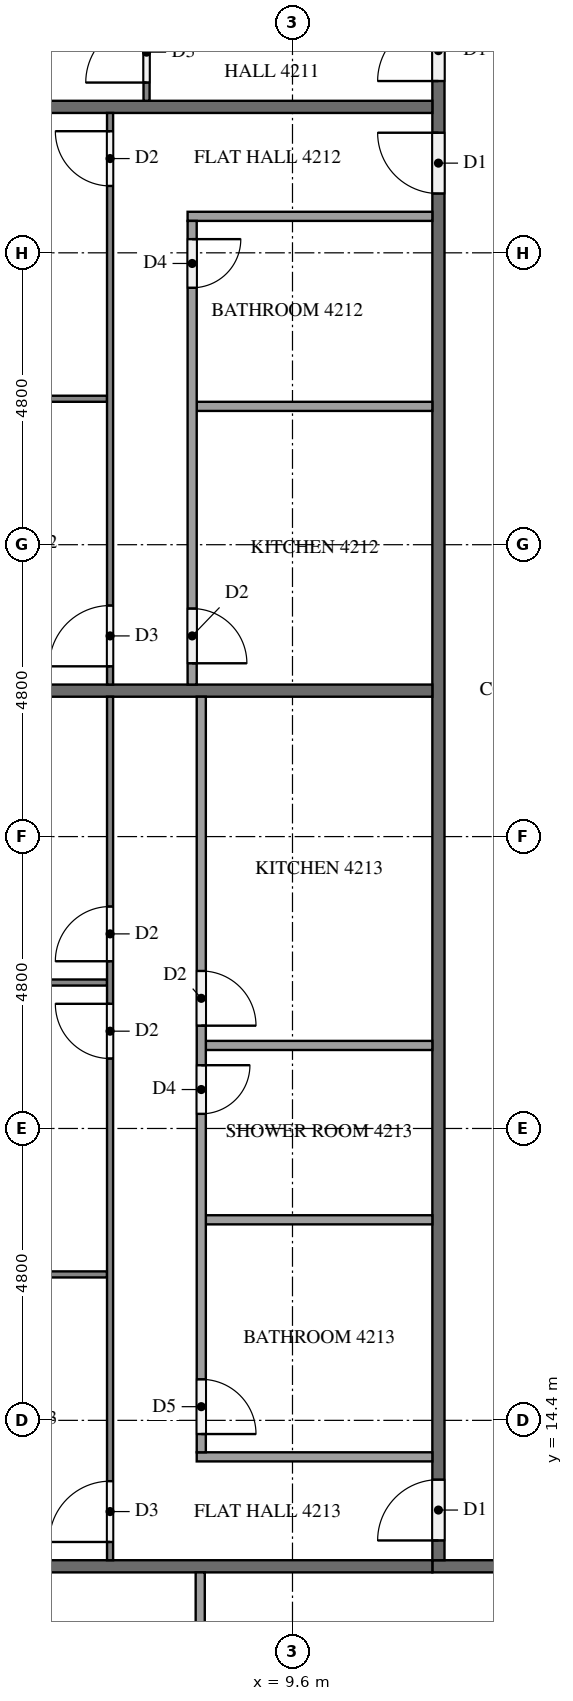
"""IFC4 building model, lengths in metres.
Left out: names, types, materials, properties, quantities, classifications, styles, units other than length and angle.
Written with IfcOpenShell. Run it as: python <this file> out.ifc"""

import sys

from ifc_helpers import new_model, si_unit, direction, frame, frame_2d, origin, place, context, subcontext, project, spatial, rectangle, extrude, element, fill, save


model = new_model("IFC4")
c1 = context("Model", 3, precision=1e-05, world=origin(), true_north=direction((0.0, 1.0)))
c2 = subcontext(c1, "Body", "Model", "MODEL_VIEW")
j1 = project(units=[si_unit("LENGTHUNIT", "METRE"), si_unit("PLANEANGLEUNIT", "RADIAN")], contexts=[c1])
p1 = place(None, origin())
s1 = spatial("IfcSite", under=j1, at=p1, CompositionType="ELEMENT")
p2 = place(p1, origin())
s2 = spatial("IfcBuilding", under=s1, at=p2, CompositionType="ELEMENT")
p3 = place(p2, frame((0.0, 0.0, 163.0)))
s3 = spatial("IfcBuildingStorey", under=s2, at=p3, CompositionType="ELEMENT", Elevation=163.0)
p4 = place(p3, frame((50.5, 12.0, 0.0), z_axis=(0.0, 0.0, 1.0), x_axis=(-1.0, 0.0, 0.0)))
e1 = element("IfcWall", 1, at=p4, inside=s3, PredefinedType="PARTITIONING", context=c2, shape_type="SweptSolid", body=[
    extrude(rectangle(XDim=38.6, YDim=0.2, at=frame_2d((19.3, 0.0))), origin(), (0.0, 0.0, 1.0), 3.2),
])
p5 = place(p4, frame((34.125, 0.0, 0.0)))
e2 = element("IfcOpeningElement", 2, at=p5, cuts=e1, PredefinedType="OPENING", context=c2, shape_type="SweptSolid", body=[
    extrude(rectangle(XDim=1.0, YDim=2.1, at=frame_2d((0.5, 1.05))), frame((0.0, 0.11, 0.0), z_axis=(0.0, -1.0, 0.0), x_axis=(1.0, 0.0, 0.0)), (0.0, 0.0, 1.0), 0.22),
])
p6 = place(p4, frame((32.275, 0.0, 0.0)))
e3 = element("IfcOpeningElement", 3, at=p6, cuts=e1, PredefinedType="OPENING", context=c2, shape_type="SweptSolid", body=[
    extrude(rectangle(XDim=1.0, YDim=2.1, at=frame_2d((0.5, 1.05))), frame((0.0, 0.11, 0.0), z_axis=(0.0, -1.0, 0.0), x_axis=(1.0, 0.0, 0.0)), (0.0, 0.0, 1.0), 0.22),
])
p7 = place(p4, frame((12.525, 0.0, 0.0)))
e4 = element("IfcOpeningElement", 4, at=p7, cuts=e1, PredefinedType="OPENING", context=c2, shape_type="SweptSolid", body=[
    extrude(rectangle(XDim=1.0, YDim=2.1, at=frame_2d((0.5, 1.05))), frame((0.0, 0.11, 0.0), z_axis=(0.0, -1.0, 0.0), x_axis=(1.0, 0.0, 0.0)), (0.0, 0.0, 1.0), 0.22),
])
p8 = place(p4, frame((10.625, 0.0, 0.0)))
e5 = element("IfcOpeningElement", 5, at=p8, cuts=e1, PredefinedType="OPENING", context=c2, shape_type="SweptSolid", body=[
    extrude(rectangle(XDim=1.1, YDim=2.1, at=frame_2d((0.55, 1.05))), frame((0.0, 0.11, 0.0), z_axis=(0.0, -1.0, 0.0), x_axis=(1.0, 0.0, 0.0)), (0.0, 0.0, 1.0), 0.22),
])
p9 = place(p3, frame((12.0, 12.1, 0.0), z_axis=(0.0, 0.0, 1.0), x_axis=(0.0, 1.0, 0.0)))
e6 = element("IfcWall", 6, at=p9, inside=s3, PredefinedType="PARTITIONING", context=c2, shape_type="SweptSolid", body=[
    extrude(rectangle(XDim=28.6, YDim=0.2, at=frame_2d((14.3, 0.0))), origin(), (0.0, 0.0, 1.0), 3.2),
])
p10 = place(p9, frame((24.325, 0.0, 0.0)))
e7 = element("IfcOpeningElement", 7, at=p10, cuts=e6, PredefinedType="OPENING", context=c2, shape_type="SweptSolid", body=[
    extrude(rectangle(XDim=1.0, YDim=2.1, at=frame_2d((0.5, 1.05))), frame((0.0, 0.11, 0.0), z_axis=(0.0, -1.0, 0.0), x_axis=(1.0, 0.0, 0.0)), (0.0, 0.0, 1.0), 0.22),
])
p11 = place(p9, frame((22.475, 0.0, 0.0)))
e8 = element("IfcOpeningElement", 8, at=p11, cuts=e6, PredefinedType="OPENING", context=c2, shape_type="SweptSolid", body=[
    extrude(rectangle(XDim=1.0, YDim=2.1, at=frame_2d((0.5, 1.05))), frame((0.0, 0.11, 0.0), z_axis=(0.0, -1.0, 0.0), x_axis=(1.0, 0.0, 0.0)), (0.0, 0.0, 1.0), 0.22),
])
p12 = place(p9, frame((0.325, 0.0, 0.0)))
e9 = element("IfcOpeningElement", 9, at=p12, cuts=e6, PredefinedType="OPENING", context=c2, shape_type="SweptSolid", body=[
    extrude(rectangle(XDim=1.0, YDim=2.1, at=frame_2d((0.5, 1.05))), frame((0.0, 0.11, 0.0), z_axis=(0.0, -1.0, 0.0), x_axis=(1.0, 0.0, 0.0)), (0.0, 0.0, 1.0), 0.22),
])
for number, where, z_axis, x_axis in (
    (10, (0.1, 12.0, 0.0), (0.0, 0.0, 1.0), (1.0, 0.0, 0.0)),
    (11, (0.1, 36.0, 0.0), (0.0, 0.0, 1.0), (1.0, 0.0, 0.0)),
    (12, (0.1, 26.4, 0.0), (0.0, 0.0, 1.0), (1.0, 0.0, 0.0)),
):
    element("IfcWall", number, at=place(p3, frame(where, z_axis=z_axis, x_axis=x_axis)), inside=s3, PredefinedType="PARTITIONING", context=c2, shape_type="SweptSolid", body=[
        extrude(rectangle(XDim=11.8, YDim=0.2, at=frame_2d((5.9, 0.0))), origin(), (0.0, 0.0, 1.0), 3.2),
    ])
p13 = place(p3, frame((8.083, 11.9, 0.0), z_axis=(0.0, 0.0, 1.0), x_axis=(0.0, -1.0, 0.0)))
e13 = element("IfcWall", 13, at=p13, inside=s3, PredefinedType="PARTITIONING", context=c2, shape_type="SweptSolid", body=[
    extrude(rectangle(XDim=2.975, YDim=0.15, at=frame_2d((1.487, 0.0))), origin(), (0.0, 0.0, 1.0), 3.2),
])
p14 = place(p3, frame((7.2, 36.1, 0.0), z_axis=(0.0, 0.0, 1.0), x_axis=(0.0, 1.0, 0.0)))
e14 = element("IfcWall", 14, at=p14, inside=s3, PredefinedType="PARTITIONING", context=c2, shape_type="SweptSolid", body=[
    extrude(rectangle(XDim=11.8, YDim=0.1, at=frame_2d((5.9, 0.0))), origin(), (0.0, 0.0, 1.0), 3.2),
])
p15 = place(p14, frame((0.3, 0.0, 0.0)))
e15 = element("IfcOpeningElement", 15, at=p15, cuts=e14, PredefinedType="OPENING", context=c2, shape_type="SweptSolid", body=[
    extrude(rectangle(XDim=1.0, YDim=2.1, at=frame_2d((0.5, 1.05))), frame((0.0, 0.06, 0.0), z_axis=(0.0, -1.0, 0.0), x_axis=(1.0, 0.0, 0.0)), (0.0, 0.0, 1.0), 0.12),
])
p16 = place(p14, frame((10.6, 0.0, 0.0)))
e16 = element("IfcOpeningElement", 16, at=p16, cuts=e14, PredefinedType="OPENING", context=c2, shape_type="SweptSolid", body=[
    extrude(rectangle(XDim=0.9, YDim=2.1, at=frame_2d((0.45, 1.05))), frame((0.0, 0.06, 0.0), z_axis=(0.0, -1.0, 0.0), x_axis=(1.0, 0.0, 0.0)), (0.0, 0.0, 1.0), 0.12),
])
p17 = place(p3, frame((6.55, 31.2, 0.0), z_axis=(0.0, 0.0, 1.0), x_axis=(-1.0, 0.0, 0.0)))
e17 = element("IfcWall", 17, at=p17, inside=s3, PredefinedType="PARTITIONING", context=c2, shape_type="SweptSolid", body=[
    extrude(rectangle(XDim=6.45, YDim=0.1, at=frame_2d((3.225, 0.0))), origin(), (0.0, 0.0, 1.0), 3.2),
])
p18 = place(p3, frame((6.6, 26.5, 0.0), z_axis=(0.0, 0.0, 1.0), x_axis=(0.0, 1.0, 0.0)))
e18 = element("IfcWall", 18, at=p18, inside=s3, PredefinedType="PARTITIONING", context=c2, shape_type="SweptSolid", body=[
    extrude(rectangle(XDim=9.4, YDim=0.1, at=frame_2d((4.7, 0.0))), origin(), (0.0, 0.0, 1.0), 3.2),
])
p19 = place(p18, frame((8.2, 0.0, 0.0)))
e19 = element("IfcOpeningElement", 19, at=p19, cuts=e18, PredefinedType="OPENING", context=c2, shape_type="SweptSolid", body=[
    extrude(rectangle(XDim=0.9, YDim=2.1, at=frame_2d((0.45, 1.05))), frame((0.0, 0.06, 0.0), z_axis=(0.0, -1.0, 0.0), x_axis=(1.0, 0.0, 0.0)), (0.0, 0.0, 1.0), 0.12),
])
p20 = place(p18, frame((0.3, 0.0, 0.0)))
e20 = element("IfcOpeningElement", 20, at=p20, cuts=e18, PredefinedType="OPENING", context=c2, shape_type="SweptSolid", body=[
    extrude(rectangle(XDim=1.0, YDim=2.1, at=frame_2d((0.5, 1.05))), frame((0.0, 0.06, 0.0), z_axis=(0.0, -1.0, 0.0), x_axis=(1.0, 0.0, 0.0)), (0.0, 0.0, 1.0), 0.12),
])
p21 = place(p3, frame((11.9, 31.075, 0.0), z_axis=(0.0, 0.0, 1.0), x_axis=(-1.0, 0.0, 0.0)))
e21 = element("IfcWall", 21, at=p21, inside=s3, PredefinedType="PARTITIONING", context=c2, shape_type="SweptSolid", body=[
    extrude(rectangle(XDim=3.875, YDim=0.15, at=frame_2d((1.938, 0.0))), origin(), (0.0, 0.0, 1.0), 3.2),
])
p22 = place(p3, frame((11.9, 34.2, 0.0), z_axis=(0.0, 0.0, 1.0), x_axis=(-1.0, 0.0, 0.0)))
e22 = element("IfcWall", 22, at=p22, inside=s3, PredefinedType="PARTITIONING", context=c2, shape_type="SweptSolid", body=[
    extrude(rectangle(XDim=4.025, YDim=0.15, at=frame_2d((2.012, 0.0))), origin(), (0.0, 0.0, 1.0), 3.2),
])
p23 = place(p3, frame((7.95, 34.125, 0.0), z_axis=(0.0, 0.0, 1.0), x_axis=(0.0, -1.0, 0.0)))
e23 = element("IfcWall", 23, at=p23, inside=s3, PredefinedType="PARTITIONING", context=c2, shape_type="SweptSolid", body=[
    extrude(rectangle(XDim=7.625, YDim=0.15, at=frame_2d((3.812, 0.0))), origin(), (0.0, 0.0, 1.0), 3.2),
])
p24 = place(p23, frame((0.3, 0.0, 0.0)))
e24 = element("IfcOpeningElement", 24, at=p24, cuts=e23, PredefinedType="OPENING", context=c2, shape_type="SweptSolid", body=[
    extrude(rectangle(XDim=0.8, YDim=2.1, at=frame_2d((0.4, 1.05))), frame((0.0, 0.085, 0.0), z_axis=(0.0, -1.0, 0.0), x_axis=(1.0, 0.0, 0.0)), (0.0, 0.0, 1.0), 0.17),
])
p25 = place(p23, frame((6.375, 0.0, 0.0)))
e25 = element("IfcOpeningElement", 25, at=p25, cuts=e23, PredefinedType="OPENING", context=c2, shape_type="SweptSolid", body=[
    extrude(rectangle(XDim=0.9, YDim=2.1, at=frame_2d((0.45, 1.05))), frame((0.0, 0.085, 0.0), z_axis=(0.0, -1.0, 0.0), x_axis=(1.0, 0.0, 0.0)), (0.0, 0.0, 1.0), 0.17),
])
for number, where, z_axis, x_axis in (
    (26, (6.55, 16.8, 0.0), (0.0, 0.0, 1.0), (-1.0, 0.0, 0.0)),
    (27, (6.55, 21.6, 0.0), (0.0, 0.0, 1.0), (-1.0, 0.0, 0.0)),
):
    element("IfcWall", number, at=place(p3, frame(where, z_axis=z_axis, x_axis=x_axis)), inside=s3, PredefinedType="PARTITIONING", context=c2, shape_type="SweptSolid", body=[
        extrude(rectangle(XDim=6.45, YDim=0.1, at=frame_2d((3.225, 0.0))), origin(), (0.0, 0.0, 1.0), 3.2),
    ])
p26 = place(p3, frame((6.6, 12.1, 0.0), z_axis=(0.0, 0.0, 1.0), x_axis=(0.0, 1.0, 0.0)))
e28 = element("IfcWall", 28, at=p26, inside=s3, PredefinedType="PARTITIONING", context=c2, shape_type="SweptSolid", body=[
    extrude(rectangle(XDim=14.2, YDim=0.1, at=frame_2d((7.1, 0.0))), origin(), (0.0, 0.0, 1.0), 3.2),
])
p27 = place(p26, frame((0.3, 0.0, 0.0)))
e29 = element("IfcOpeningElement", 29, at=p27, cuts=e28, PredefinedType="OPENING", context=c2, shape_type="SweptSolid", body=[
    extrude(rectangle(XDim=1.0, YDim=2.1, at=frame_2d((0.5, 1.05))), frame((0.0, 0.06, 0.0), z_axis=(0.0, -1.0, 0.0), x_axis=(1.0, 0.0, 0.0)), (0.0, 0.0, 1.0), 0.12),
])
p28 = place(p26, frame((8.25, 0.0, 0.0)))
e30 = element("IfcOpeningElement", 30, at=p28, cuts=e28, PredefinedType="OPENING", context=c2, shape_type="SweptSolid", body=[
    extrude(rectangle(XDim=0.9, YDim=2.1, at=frame_2d((0.45, 1.05))), frame((0.0, 0.06, 0.0), z_axis=(0.0, -1.0, 0.0), x_axis=(1.0, 0.0, 0.0)), (0.0, 0.0, 1.0), 0.12),
])
p29 = place(p26, frame((9.85, 0.0, 0.0)))
e31 = element("IfcOpeningElement", 31, at=p29, cuts=e28, PredefinedType="OPENING", context=c2, shape_type="SweptSolid", body=[
    extrude(rectangle(XDim=0.9, YDim=2.1, at=frame_2d((0.45, 1.05))), frame((0.0, 0.06, 0.0), z_axis=(0.0, -1.0, 0.0), x_axis=(1.0, 0.0, 0.0)), (0.0, 0.0, 1.0), 0.12),
])
for number, where, z_axis, x_axis in (
    (32, (11.9, 17.698, 0.0), (0.0, 0.0, 1.0), (-1.0, 0.0, 0.0)),
    (33, (11.9, 20.565, 0.0), (0.0, 0.0, 1.0), (-1.0, 0.0, 0.0)),
):
    element("IfcWall", number, at=place(p3, frame(where, z_axis=z_axis, x_axis=x_axis)), inside=s3, PredefinedType="PARTITIONING", context=c2, shape_type="SweptSolid", body=[
        extrude(rectangle(XDim=3.725, YDim=0.15, at=frame_2d((1.862, 0.0))), origin(), (0.0, 0.0, 1.0), 3.2),
    ])
p30 = place(p3, frame((11.9, 13.8, 0.0), z_axis=(0.0, 0.0, 1.0), x_axis=(-1.0, 0.0, 0.0)))
e34 = element("IfcWall", 34, at=p30, inside=s3, PredefinedType="PARTITIONING", context=c2, shape_type="SweptSolid", body=[
    extrude(rectangle(XDim=3.875, YDim=0.15, at=frame_2d((1.938, 0.0))), origin(), (0.0, 0.0, 1.0), 3.2),
])
p31 = place(p3, frame((8.1, 26.3, 0.0), z_axis=(0.0, 0.0, 1.0), x_axis=(0.0, -1.0, 0.0)))
e35 = element("IfcWall", 35, at=p31, inside=s3, PredefinedType="PARTITIONING", context=c2, shape_type="SweptSolid", body=[
    extrude(rectangle(XDim=12.425, YDim=0.15, at=frame_2d((6.212, 0.0))), origin(), (0.0, 0.0, 1.0), 3.2),
])
p32 = place(p31, frame((11.225, 0.0, 0.0)))
e36 = element("IfcOpeningElement", 36, at=p32, cuts=e35, PredefinedType="OPENING", context=c2, shape_type="SweptSolid", body=[
    extrude(rectangle(XDim=0.9, YDim=2.1, at=frame_2d((0.45, 1.05))), frame((0.0, 0.085, 0.0), z_axis=(0.0, -1.0, 0.0), x_axis=(1.0, 0.0, 0.0)), (0.0, 0.0, 1.0), 0.17),
])
p33 = place(p31, frame((6.06, 0.0, 0.0)))
e37 = element("IfcOpeningElement", 37, at=p33, cuts=e35, PredefinedType="OPENING", context=c2, shape_type="SweptSolid", body=[
    extrude(rectangle(XDim=0.8, YDim=2.1, at=frame_2d((0.4, 1.05))), frame((0.0, 0.085, 0.0), z_axis=(0.0, -1.0, 0.0), x_axis=(1.0, 0.0, 0.0)), (0.0, 0.0, 1.0), 0.17),
])
p34 = place(p31, frame((4.51, 0.0, 0.0)))
e38 = element("IfcOpeningElement", 38, at=p34, cuts=e35, PredefinedType="OPENING", context=c2, shape_type="SweptSolid", body=[
    extrude(rectangle(XDim=0.9, YDim=2.1, at=frame_2d((0.45, 1.05))), frame((0.0, 0.085, 0.0), z_axis=(0.0, -1.0, 0.0), x_axis=(1.0, 0.0, 0.0)), (0.0, 0.0, 1.0), 0.17),
])
p35 = place(p10, origin())
e39 = element("IfcDoor", 39, at=p35, inside=s3, OperationType="SINGLE_SWING_LEFT", PredefinedType="DOOR", context=c2, shape_type="SweptSolid", body=[
    extrude(rectangle(XDim=1.0, YDim=2.1, at=frame_2d((0.5, 1.05))), frame((0.0, 0.025, 0.0), z_axis=(0.0, -1.0, 0.0), x_axis=(1.0, 0.0, 0.0)), (0.0, 0.0, 1.0), 0.05),
])
fill(e7, e39)
p36 = place(p11, origin())
e40 = element("IfcDoor", 40, at=p36, inside=s3, OperationType="SINGLE_SWING_RIGHT", PredefinedType="DOOR", context=c2, shape_type="SweptSolid", body=[
    extrude(rectangle(XDim=1.0, YDim=2.1, at=frame_2d((0.5, 1.05))), frame((0.0, 0.025, 0.0), z_axis=(0.0, -1.0, 0.0), x_axis=(1.0, 0.0, 0.0)), (0.0, 0.0, 1.0), 0.05),
])
fill(e8, e40)
p37 = place(p12, origin())
e41 = element("IfcDoor", 41, at=p37, inside=s3, OperationType="SINGLE_SWING_LEFT", PredefinedType="DOOR", context=c2, shape_type="SweptSolid", body=[
    extrude(rectangle(XDim=1.0, YDim=2.1, at=frame_2d((0.5, 1.05))), frame((0.0, 0.025, 0.0), z_axis=(0.0, -1.0, 0.0), x_axis=(1.0, 0.0, 0.0)), (0.0, 0.0, 1.0), 0.05),
])
fill(e9, e41)
p38 = place(p15, origin())
e42 = element("IfcDoor", 42, at=p38, inside=s3, OperationType="SINGLE_SWING_LEFT", PredefinedType="DOOR", context=c2, shape_type="SweptSolid", body=[
    extrude(rectangle(XDim=1.0, YDim=2.1, at=frame_2d((0.5, 1.05))), frame((0.0, 0.025, 0.0), z_axis=(0.0, -1.0, 0.0), x_axis=(1.0, 0.0, 0.0)), (0.0, 0.0, 1.0), 0.05),
])
fill(e15, e42)
p39 = place(p19, origin())
e43 = element("IfcDoor", 43, at=p39, inside=s3, OperationType="SINGLE_SWING_RIGHT", PredefinedType="DOOR", context=c2, shape_type="SweptSolid", body=[
    extrude(rectangle(XDim=0.9, YDim=2.1, at=frame_2d((0.45, 1.05))), frame((0.0, 0.025, 0.0), z_axis=(0.0, -1.0, 0.0), x_axis=(1.0, 0.0, 0.0)), (0.0, 0.0, 1.0), 0.05),
])
fill(e19, e43)
p40 = place(p20, origin())
e44 = element("IfcDoor", 44, at=p40, inside=s3, OperationType="SINGLE_SWING_LEFT", PredefinedType="DOOR", context=c2, shape_type="SweptSolid", body=[
    extrude(rectangle(XDim=1.0, YDim=2.1, at=frame_2d((0.5, 1.05))), frame((0.0, 0.025, 0.0), z_axis=(0.0, -1.0, 0.0), x_axis=(1.0, 0.0, 0.0)), (0.0, 0.0, 1.0), 0.05),
])
fill(e20, e44)
p41 = place(p24, origin())
e45 = element("IfcDoor", 45, at=p41, inside=s3, OperationType="SINGLE_SWING_LEFT", PredefinedType="DOOR", context=c2, shape_type="SweptSolid", body=[
    extrude(rectangle(XDim=0.8, YDim=2.1, at=frame_2d((0.4, 1.05))), frame((0.0, 0.025, 0.0), z_axis=(0.0, -1.0, 0.0), x_axis=(1.0, 0.0, 0.0)), (0.0, 0.0, 1.0), 0.05),
])
fill(e24, e45)
p42 = place(p25, origin())
e46 = element("IfcDoor", 46, at=p42, inside=s3, OperationType="SINGLE_SWING_RIGHT", PredefinedType="DOOR", context=c2, shape_type="SweptSolid", body=[
    extrude(rectangle(XDim=0.9, YDim=2.1, at=frame_2d((0.45, 1.05))), frame((0.0, 0.025, 0.0), z_axis=(0.0, -1.0, 0.0), x_axis=(1.0, 0.0, 0.0)), (0.0, 0.0, 1.0), 0.05),
])
fill(e25, e46)
p43 = place(p27, origin())
e47 = element("IfcDoor", 47, at=p43, inside=s3, OperationType="SINGLE_SWING_LEFT", PredefinedType="DOOR", context=c2, shape_type="SweptSolid", body=[
    extrude(rectangle(XDim=1.0, YDim=2.1, at=frame_2d((0.5, 1.05))), frame((0.0, 0.025, 0.0), z_axis=(0.0, -1.0, 0.0), x_axis=(1.0, 0.0, 0.0)), (0.0, 0.0, 1.0), 0.05),
])
fill(e29, e47)
p44 = place(p28, origin())
e48 = element("IfcDoor", 48, at=p44, inside=s3, OperationType="SINGLE_SWING_RIGHT", PredefinedType="DOOR", context=c2, shape_type="SweptSolid", body=[
    extrude(rectangle(XDim=0.9, YDim=2.1, at=frame_2d((0.45, 1.05))), frame((0.0, 0.025, 0.0), z_axis=(0.0, -1.0, 0.0), x_axis=(1.0, 0.0, 0.0)), (0.0, 0.0, 1.0), 0.05),
])
fill(e30, e48)
p45 = place(p29, origin())
e49 = element("IfcDoor", 49, at=p45, inside=s3, OperationType="SINGLE_SWING_LEFT", PredefinedType="DOOR", context=c2, shape_type="SweptSolid", body=[
    extrude(rectangle(XDim=0.9, YDim=2.1, at=frame_2d((0.45, 1.05))), frame((0.0, 0.025, 0.0), z_axis=(0.0, -1.0, 0.0), x_axis=(1.0, 0.0, 0.0)), (0.0, 0.0, 1.0), 0.05),
])
fill(e31, e49)
p46 = place(p32, origin())
e50 = element("IfcDoor", 50, at=p46, inside=s3, OperationType="SINGLE_SWING_RIGHT", PredefinedType="DOOR", context=c2, shape_type="SweptSolid", body=[
    extrude(rectangle(XDim=0.9, YDim=2.1, at=frame_2d((0.45, 1.05))), frame((0.0, 0.025, 0.0), z_axis=(0.0, -1.0, 0.0), x_axis=(1.0, 0.0, 0.0)), (0.0, 0.0, 1.0), 0.05),
])
fill(e36, e50)
p47 = place(p33, origin())
e51 = element("IfcDoor", 51, at=p47, inside=s3, OperationType="SINGLE_SWING_LEFT", PredefinedType="DOOR", context=c2, shape_type="SweptSolid", body=[
    extrude(rectangle(XDim=0.8, YDim=2.1, at=frame_2d((0.4, 1.05))), frame((0.0, 0.025, 0.0), z_axis=(0.0, -1.0, 0.0), x_axis=(1.0, 0.0, 0.0)), (0.0, 0.0, 1.0), 0.05),
])
fill(e37, e51)
p48 = place(p34, origin())
e52 = element("IfcDoor", 52, at=p48, inside=s3, OperationType="SINGLE_SWING_RIGHT", PredefinedType="DOOR", context=c2, shape_type="SweptSolid", body=[
    extrude(rectangle(XDim=0.9, YDim=2.1, at=frame_2d((0.45, 1.05))), frame((0.0, 0.025, 0.0), z_axis=(0.0, -1.0, 0.0), x_axis=(1.0, 0.0, 0.0)), (0.0, 0.0, 1.0), 0.05),
])
fill(e38, e52)
save(model, sys.argv[1])
